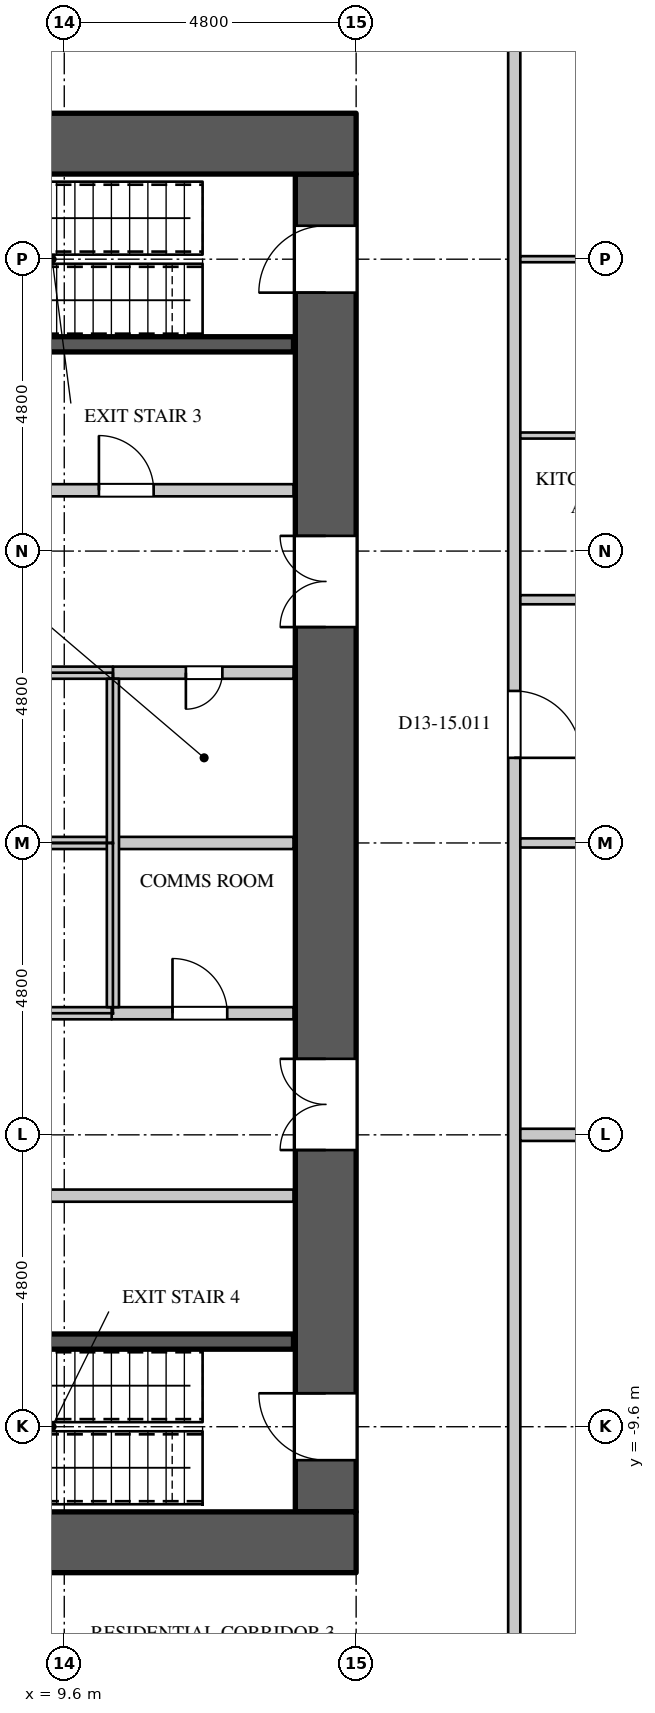
"""IFC4 building model, lengths in metres.
Left out: names, types, materials, properties, quantities, classifications, styles, units other than length and angle.
Written with IfcOpenShell. Run it as: python <this file> out.ifc"""

import sys

from ifc_helpers import new_model, si_unit, direction, frame, frame_2d, origin, place, context, subcontext, project, spatial, rectangle, extrude, element, fill, save


model = new_model("IFC4")
c1 = context("Model", 3, precision=1e-05, world=origin(), true_north=direction((0.0, 1.0)))
c2 = subcontext(c1, "Body", "Model", "MODEL_VIEW")
j1 = project(units=[si_unit("LENGTHUNIT", "METRE"), si_unit("PLANEANGLEUNIT", "RADIAN")], contexts=[c1])
p1 = place(None, origin())
s1 = spatial("IfcSite", under=j1, at=p1, CompositionType="ELEMENT")
p2 = place(p1, origin())
s2 = spatial("IfcBuilding", under=s1, at=p2, CompositionType="ELEMENT")
p3 = place(p2, frame((0.0, 0.0, 59.1)))
s3 = spatial("IfcBuildingStorey", under=s2, at=p3, CompositionType="ELEMENT", Elevation=59.1)
for number, where, z_axis, x_axis in (
    (1, (-14.4, 11.5, 0.0), (0.0, 0.0, 1.0), (1.0, 0.0, 0.0)),
    (2, (-14.4, -11.5, 0.0), (0.0, 0.0, 1.0), (1.0, 0.0, 0.0)),
):
    element("IfcWall", number, at=place(p3, frame(where, z_axis=z_axis, x_axis=x_axis)), inside=s3, PredefinedType="SHEAR", context=c2, shape_type="SweptSolid", body=[
        extrude(rectangle(XDim=28.8, YDim=1.0, at=frame_2d((14.4, 0.0))), origin(), (0.0, 0.0, 1.0), 4.2),
    ])
p4 = place(p3, frame((13.9, -11.0, 0.0), z_axis=(0.0, 0.0, 1.0), x_axis=(0.0, 1.0, 0.0)))
e3 = element("IfcWall", 3, at=p4, inside=s3, PredefinedType="SHEAR", context=c2, shape_type="SweptSolid", body=[
    extrude(rectangle(XDim=22.0, YDim=1.0, at=frame_2d((11.0, 0.0))), origin(), (0.0, 0.0, 1.0), 4.2),
])
p5 = place(p4, frame((20.05, 0.0, 0.0)))
e4 = element("IfcOpeningElement", 4, at=p5, cuts=e3, PredefinedType="OPENING", context=c2, shape_type="SweptSolid", body=[
    extrude(rectangle(XDim=1.1, YDim=2.2, at=frame_2d((0.55, 1.1))), frame((0.0, 0.51, 0.0), z_axis=(0.0, -1.0, 0.0), x_axis=(1.0, 0.0, 0.0)), (0.0, 0.0, 1.0), 1.02),
])
p6 = place(p4, frame((0.85, 0.0, 0.0)))
e5 = element("IfcOpeningElement", 5, at=p6, cuts=e3, PredefinedType="OPENING", context=c2, shape_type="SweptSolid", body=[
    extrude(rectangle(XDim=1.1, YDim=2.2, at=frame_2d((0.55, 1.1))), frame((0.0, 0.51, 0.0), z_axis=(0.0, -1.0, 0.0), x_axis=(1.0, 0.0, 0.0)), (0.0, 0.0, 1.0), 1.02),
])
p7 = place(p4, frame((14.55, 0.0, 0.0)))
e6 = element("IfcOpeningElement", 6, at=p7, cuts=e3, PredefinedType="OPENING", context=c2, shape_type="SweptSolid", body=[
    extrude(rectangle(XDim=1.5, YDim=2.4, at=frame_2d((0.75, 1.2))), frame((0.0, 0.51, 0.0), z_axis=(0.0, -1.0, 0.0), x_axis=(1.0, 0.0, 0.0)), (0.0, 0.0, 1.0), 1.02),
])
p8 = place(p4, frame((5.95, 0.0, 0.0)))
e7 = element("IfcOpeningElement", 7, at=p8, cuts=e3, PredefinedType="OPENING", context=c2, shape_type="SweptSolid", body=[
    extrude(rectangle(XDim=1.5, YDim=2.4, at=frame_2d((0.75, 1.2))), frame((0.0, 0.51, 0.0), z_axis=(0.0, -1.0, 0.0), x_axis=(1.0, 0.0, 0.0)), (0.0, 0.0, 1.0), 1.02),
])
p9 = place(p3, frame((-7.7, -5.8, 0.0), z_axis=(0.0, 0.0, 1.0), x_axis=(1.0, 0.0, 0.0)))
e8 = element("IfcWall", 8, at=p9, inside=s3, PredefinedType="PARTITIONING", context=c2, shape_type="SweptSolid", body=[
    extrude(rectangle(XDim=21.07, YDim=0.2, at=frame_2d((10.535, 0.0))), origin(), (0.0, 0.0, 1.0), 3.95),
])
p10 = place(p9, frame((5.25, 0.0, 0.0)))
e9 = element("IfcOpeningElement", 9, at=p10, cuts=e8, PredefinedType="OPENING", context=c2, shape_type="SweptSolid", body=[
    extrude(rectangle(XDim=0.9, YDim=2.2, at=frame_2d((0.45, 1.1))), frame((0.0, 0.11, 0.0), z_axis=(0.0, -1.0, 0.0), x_axis=(1.0, 0.0, 0.0)), (0.0, 0.0, 1.0), 0.22),
])
p11 = place(p9, frame((15.65, 0.0, 0.0)))
e10 = element("IfcOpeningElement", 10, at=p11, cuts=e8, PredefinedType="OPENING", context=c2, shape_type="SweptSolid", body=[
    extrude(rectangle(XDim=0.9, YDim=2.2, at=frame_2d((0.45, 1.1))), frame((0.0, 0.11, 0.0), z_axis=(0.0, -1.0, 0.0), x_axis=(1.0, 0.0, 0.0)), (0.0, 0.0, 1.0), 0.22),
])
p12 = place(p3, frame((7.82, 5.8, 0.0), z_axis=(0.0, 0.0, 1.0), x_axis=(1.0, 0.0, 0.0)))
e11 = element("IfcWall", 11, at=p12, inside=s3, PredefinedType="PARTITIONING", context=c2, shape_type="SweptSolid", body=[
    extrude(rectangle(XDim=5.55, YDim=0.2, at=frame_2d((2.775, 0.0))), origin(), (0.0, 0.0, 1.0), 3.95),
])
p13 = place(p12, frame((2.35, 0.0, 0.0)))
e12 = element("IfcOpeningElement", 12, at=p13, cuts=e11, PredefinedType="OPENING", context=c2, shape_type="SweptSolid", body=[
    extrude(rectangle(XDim=0.9, YDim=2.2, at=frame_2d((0.45, 1.1))), frame((0.0, 0.11, 0.0), z_axis=(0.0, -1.0, 0.0), x_axis=(1.0, 0.0, 0.0)), (0.0, 0.0, 1.0), 0.22),
])
p14 = place(p3, frame((17.0, -14.5, 0.0), z_axis=(0.0, 0.0, 1.0), x_axis=(0.0, 1.0, 0.0)))
e13 = element("IfcWall", 13, at=p14, inside=s3, PredefinedType="PARTITIONING", context=c2, shape_type="SweptSolid", body=[
    extrude(rectangle(XDim=29.0, YDim=0.2, at=frame_2d((14.5, 0.0))), origin(), (0.0, 0.0, 1.0), 3.95),
])
p15 = place(p14, frame((15.9, 0.0, 0.0)))
e14 = element("IfcOpeningElement", 14, at=p15, cuts=e13, PredefinedType="OPENING", context=c2, shape_type="SweptSolid", body=[
    extrude(rectangle(XDim=1.1, YDim=2.4, at=frame_2d((0.55, 1.2))), frame((0.0, 0.11, 0.0), z_axis=(0.0, -1.0, 0.0), x_axis=(1.0, 0.0, 0.0)), (0.0, 0.0, 1.0), 0.22),
])
p16 = place(p3, frame((16.02, -19.26, 0.0), z_axis=(0.0, 0.0, 1.0), x_axis=(0.707106781187, 0.707106781187, 0.0)))
e15 = element("IfcWall", 15, at=p16, inside=s3, PredefinedType="PARTITIONING", context=c2, shape_type="SweptSolid", body=[
    extrude(rectangle(XDim=10.229, YDim=0.15, at=frame_2d((5.114, 0.0))), origin(), (0.0, 0.0, 1.0), 3.95),
])
p17 = place(p16, frame((4.3, 0.0, 0.0)))
e16 = element("IfcOpeningElement", 16, at=p17, cuts=e15, PredefinedType="OPENING", context=c2, shape_type="SweptSolid", body=[
    extrude(rectangle(XDim=0.95, YDim=2.2, at=frame_2d((0.475, 1.1))), frame((0.0, 0.085, 0.0), z_axis=(0.0, -1.0, 0.0), x_axis=(1.0, 0.0, 0.0)), (0.0, 0.0, 1.0), 0.17),
])
p18 = place(p16, frame((0.6, 0.0, 0.0)))
e17 = element("IfcOpeningElement", 17, at=p18, cuts=e15, PredefinedType="OPENING", context=c2, shape_type="SweptSolid", body=[
    extrude(rectangle(XDim=0.95, YDim=2.2, at=frame_2d((0.475, 1.1))), frame((0.0, 0.085, 0.0), z_axis=(0.0, -1.0, 0.0), x_axis=(1.0, 0.0, 0.0)), (0.0, 0.0, 1.0), 0.17),
])
p19 = place(p16, frame((9.1, 0.0, 0.0)))
e18 = element("IfcOpeningElement", 18, at=p19, cuts=e15, PredefinedType="OPENING", context=c2, shape_type="SweptSolid", body=[
    extrude(rectangle(XDim=0.95, YDim=2.2, at=frame_2d((0.475, 1.1))), frame((0.0, 0.085, 0.0), z_axis=(0.0, -1.0, 0.0), x_axis=(1.0, 0.0, 0.0)), (0.0, 0.0, 1.0), 0.17),
])
p20 = place(p3, frame((17.1, 0.0, 0.0), z_axis=(0.0, 0.0, 1.0), x_axis=(1.0, 0.0, 0.0)))
e19 = element("IfcWall", 19, at=p20, inside=s3, PredefinedType="PARTITIONING", context=c2, shape_type="SweptSolid", body=[
    extrude(rectangle(XDim=11.755, YDim=0.15, at=frame_2d((5.877, 0.0))), origin(), (0.0, 0.0, 1.0), 3.95),
])
p21 = place(p20, frame((1.8, 0.0, 0.0)))
e20 = element("IfcOpeningElement", 20, at=p21, cuts=e19, PredefinedType="OPENING", context=c2, shape_type="SweptSolid", body=[
    extrude(rectangle(XDim=0.95, YDim=2.2, at=frame_2d((0.475, 1.1))), frame((0.0, 0.085, 0.0), z_axis=(0.0, -1.0, 0.0), x_axis=(1.0, 0.0, 0.0)), (0.0, 0.0, 1.0), 0.17),
])
p22 = place(p3, frame((17.1, 4.0, 0.0), z_axis=(0.0, 0.0, 1.0), x_axis=(1.0, 0.0, 0.0)))
e21 = element("IfcWall", 21, at=p22, inside=s3, PredefinedType="PARTITIONING", context=c2, shape_type="SweptSolid", body=[
    extrude(rectangle(XDim=4.625, YDim=0.15, at=frame_2d((2.312, 0.0))), origin(), (0.0, 0.0, 1.0), 3.95),
])
p23 = place(p22, frame((1.85, 0.0, 0.0)))
e22 = element("IfcOpeningElement", 22, at=p23, cuts=e21, PredefinedType="OPENING", context=c2, shape_type="SweptSolid", body=[
    extrude(rectangle(XDim=0.95, YDim=2.2, at=frame_2d((0.475, 1.1))), frame((0.0, 0.085, 0.0), z_axis=(0.0, -1.0, 0.0), x_axis=(1.0, 0.0, 0.0)), (0.0, 0.0, 1.0), 0.17),
])
p24 = place(p3, frame((17.499, 17.499, 0.0), z_axis=(0.0, 0.0, 1.0), x_axis=(0.707106781187, -0.707106781187, 0.0)))
e23 = element("IfcWall", 23, at=p24, inside=s3, PredefinedType="PARTITIONING", context=c2, shape_type="SweptSolid", body=[
    extrude(rectangle(XDim=7.855, YDim=0.15, at=frame_2d((3.927, 0.0))), origin(), (0.0, 0.0, 1.0), 3.95),
])
p25 = place(p24, frame((6.7, 0.0, 0.0)))
e24 = element("IfcOpeningElement", 24, at=p25, cuts=e23, PredefinedType="OPENING", context=c2, shape_type="SweptSolid", body=[
    extrude(rectangle(XDim=0.95, YDim=2.2, at=frame_2d((0.475, 1.1))), frame((0.0, 0.085, 0.0), z_axis=(0.0, -1.0, 0.0), x_axis=(1.0, 0.0, 0.0)), (0.0, 0.0, 1.0), 0.17),
])
p26 = place(p24, frame((2.1, 0.0, 0.0)))
e25 = element("IfcOpeningElement", 25, at=p26, cuts=e23, PredefinedType="OPENING", context=c2, shape_type="SweptSolid", body=[
    extrude(rectangle(XDim=0.95, YDim=2.2, at=frame_2d((0.475, 1.1))), frame((0.0, 0.085, 0.0), z_axis=(0.0, -1.0, 0.0), x_axis=(1.0, 0.0, 0.0)), (0.0, 0.0, 1.0), 0.17),
])
p27 = place(p3, frame((17.1, -4.8, 0.0), z_axis=(0.0, 0.0, 1.0), x_axis=(1.0, 0.0, 0.0)))
e26 = element("IfcWall", 26, at=p27, inside=s3, PredefinedType="PARTITIONING", context=c2, shape_type="SweptSolid", body=[
    extrude(rectangle(XDim=10.8, YDim=0.2, at=frame_2d((5.4, 0.0))), origin(), (0.0, 0.0, 1.0), 3.25),
])
p28 = place(p3, frame((10.38, -2.8, 0.0), z_axis=(0.0, 0.0, 1.0), x_axis=(1.0, 0.0, 0.0)))
e27 = element("IfcWall", 27, at=p28, inside=s3, PredefinedType="PARTITIONING", context=c2, shape_type="SweptSolid", body=[
    extrude(rectangle(XDim=2.99, YDim=0.2, at=frame_2d((1.495, 0.0))), origin(), (0.0, 0.0, 1.0), 3.95),
])
p29 = place(p28, frame((1.0, 0.0, 0.0)))
e28 = element("IfcOpeningElement", 28, at=p29, cuts=e27, PredefinedType="OPENING", context=c2, shape_type="SweptSolid", body=[
    extrude(rectangle(XDim=0.9, YDim=2.2, at=frame_2d((0.45, 1.1))), frame((0.0, 0.11, 0.0), z_axis=(0.0, -1.0, 0.0), x_axis=(1.0, 0.0, 0.0)), (0.0, 0.0, 1.0), 0.22),
])
p30 = place(p3, frame((10.4, 2.8, 0.0), z_axis=(0.0, 0.0, 1.0), x_axis=(1.0, 0.0, 0.0)))
e29 = element("IfcWall", 29, at=p30, inside=s3, PredefinedType="PARTITIONING", context=c2, shape_type="SweptSolid", body=[
    extrude(rectangle(XDim=2.97, YDim=0.2, at=frame_2d((1.485, 0.0))), origin(), (0.0, 0.0, 1.0), 3.95),
])
p31 = place(p30, frame((1.2, 0.0, 0.0)))
e30 = element("IfcOpeningElement", 30, at=p31, cuts=e29, PredefinedType="OPENING", context=c2, shape_type="SweptSolid", body=[
    extrude(rectangle(XDim=0.6, YDim=2.0, at=frame_2d((0.3, 1.0))), frame((0.0, 0.11, 0.0), z_axis=(0.0, -1.0, 0.0), x_axis=(1.0, 0.0, 0.0)), (0.0, 0.0, 1.0), 0.22),
])
p32 = place(p3, frame((10.4, 0.0, 0.0), z_axis=(0.0, 0.0, 1.0), x_axis=(1.0, 0.0, 0.0)))
e31 = element("IfcWall", 31, at=p32, inside=s3, PredefinedType="PARTITIONING", context=c2, shape_type="SweptSolid", body=[
    extrude(rectangle(XDim=2.97, YDim=0.2, at=frame_2d((1.485, 0.0))), origin(), (0.0, 0.0, 1.0), 3.95),
])
p33 = place(p3, frame((-13.37, 0.0, 0.0), z_axis=(0.0, 0.0, 1.0), x_axis=(1.0, 0.0, 0.0)))
e32 = element("IfcWall", 32, at=p33, inside=s3, PredefinedType="PARTITIONING", context=c2, shape_type="SweptSolid", body=[
    extrude(rectangle(XDim=23.77, YDim=0.2, at=frame_2d((11.885, 0.0))), origin(), (0.0, 0.0, 1.0), 3.95),
])
p34 = place(p3, frame((-13.37, 2.8, 0.0), z_axis=(0.0, 0.0, 1.0), x_axis=(1.0, 0.0, 0.0)))
e33 = element("IfcWall", 33, at=p34, inside=s3, PredefinedType="PARTITIONING", context=c2, shape_type="SweptSolid", body=[
    extrude(rectangle(XDim=23.77, YDim=0.2, at=frame_2d((11.885, 0.0))), origin(), (0.0, 0.0, 1.0), 3.95),
])
p35 = place(p34, frame((0.9, 0.0, 0.0)))
e34 = element("IfcOpeningElement", 34, at=p35, cuts=e33, PredefinedType="OPENING", context=c2, shape_type="SweptSolid", body=[
    extrude(rectangle(XDim=1.1, YDim=2.2, at=frame_2d((0.55, 1.1))), frame((0.0, 0.11, 0.0), z_axis=(0.0, -1.0, 0.0), x_axis=(1.0, 0.0, 0.0)), (0.0, 0.0, 1.0), 0.22),
])
p36 = place(p34, frame((3.7, 0.0, 0.0)))
e35 = element("IfcOpeningElement", 35, at=p36, cuts=e33, PredefinedType="OPENING", context=c2, shape_type="SweptSolid", body=[
    extrude(rectangle(XDim=1.1, YDim=2.2, at=frame_2d((0.55, 1.1))), frame((0.0, 0.11, 0.0), z_axis=(0.0, -1.0, 0.0), x_axis=(1.0, 0.0, 0.0)), (0.0, 0.0, 1.0), 0.22),
])
p37 = place(p34, frame((6.3, 0.0, 0.0)))
e36 = element("IfcOpeningElement", 36, at=p37, cuts=e33, PredefinedType="OPENING", context=c2, shape_type="SweptSolid", body=[
    extrude(rectangle(XDim=1.1, YDim=2.2, at=frame_2d((0.55, 1.1))), frame((0.0, 0.11, 0.0), z_axis=(0.0, -1.0, 0.0), x_axis=(1.0, 0.0, 0.0)), (0.0, 0.0, 1.0), 0.22),
])
p38 = place(p34, frame((8.9, 0.0, 0.0)))
e37 = element("IfcOpeningElement", 37, at=p38, cuts=e33, PredefinedType="OPENING", context=c2, shape_type="SweptSolid", body=[
    extrude(rectangle(XDim=1.1, YDim=2.2, at=frame_2d((0.55, 1.1))), frame((0.0, 0.11, 0.0), z_axis=(0.0, -1.0, 0.0), x_axis=(1.0, 0.0, 0.0)), (0.0, 0.0, 1.0), 0.22),
])
p39 = place(p34, frame((11.5, 0.0, 0.0)))
e38 = element("IfcOpeningElement", 38, at=p39, cuts=e33, PredefinedType="OPENING", context=c2, shape_type="SweptSolid", body=[
    extrude(rectangle(XDim=1.1, YDim=2.2, at=frame_2d((0.55, 1.1))), frame((0.0, 0.11, 0.0), z_axis=(0.0, -1.0, 0.0), x_axis=(1.0, 0.0, 0.0)), (0.0, 0.0, 1.0), 0.22),
])
p40 = place(p34, frame((14.1, 0.0, 0.0)))
e39 = element("IfcOpeningElement", 39, at=p40, cuts=e33, PredefinedType="OPENING", context=c2, shape_type="SweptSolid", body=[
    extrude(rectangle(XDim=1.1, YDim=2.2, at=frame_2d((0.55, 1.1))), frame((0.0, 0.11, 0.0), z_axis=(0.0, -1.0, 0.0), x_axis=(1.0, 0.0, 0.0)), (0.0, 0.0, 1.0), 0.22),
])
p41 = place(p34, frame((16.7, 0.0, 0.0)))
e40 = element("IfcOpeningElement", 40, at=p41, cuts=e33, PredefinedType="OPENING", context=c2, shape_type="SweptSolid", body=[
    extrude(rectangle(XDim=1.1, YDim=2.2, at=frame_2d((0.55, 1.1))), frame((0.0, 0.11, 0.0), z_axis=(0.0, -1.0, 0.0), x_axis=(1.0, 0.0, 0.0)), (0.0, 0.0, 1.0), 0.22),
])
p42 = place(p34, frame((19.3, 0.0, 0.0)))
e41 = element("IfcOpeningElement", 41, at=p42, cuts=e33, PredefinedType="OPENING", context=c2, shape_type="SweptSolid", body=[
    extrude(rectangle(XDim=1.1, YDim=2.2, at=frame_2d((0.55, 1.1))), frame((0.0, 0.11, 0.0), z_axis=(0.0, -1.0, 0.0), x_axis=(1.0, 0.0, 0.0)), (0.0, 0.0, 1.0), 0.22),
])
p43 = place(p3, frame((7.82, -2.8, 0.0), z_axis=(0.0, 0.0, 1.0), x_axis=(1.0, 0.0, 0.0)))
e42 = element("IfcWall", 42, at=p43, inside=s3, PredefinedType="PARTITIONING", context=c2, shape_type="SweptSolid", body=[
    extrude(rectangle(XDim=2.56, YDim=0.2, at=frame_2d((1.28, 0.0))), origin(), (0.0, 0.0, 1.0), 3.95),
])
p44 = place(p3, frame((10.4, -2.7, 0.0), z_axis=(0.0, 0.0, 1.0), x_axis=(0.0, 1.0, 0.0)))
e43 = element("IfcWall", 43, at=p44, inside=s3, PredefinedType="PARTITIONING", context=c2, shape_type="SweptSolid", body=[
    extrude(rectangle(XDim=5.4, YDim=0.2, at=frame_2d((2.7, 0.0))), origin(), (0.0, 0.0, 1.0), 3.95),
])
for number, where, z_axis, x_axis in (
    (44, (5.275, -8.2, 0.0), (0.0, 0.0, 1.0), (1.0, 0.0, 0.0)),
    (45, (5.275, 8.2, 0.0), (0.0, 0.0, 1.0), (1.0, 0.0, 0.0)),
):
    element("IfcWall", number, at=place(p3, frame(where, z_axis=z_axis, x_axis=x_axis)), inside=s3, PredefinedType="SHEAR", context=c2, shape_type="SweptSolid", body=[
        extrude(rectangle(XDim=8.095, YDim=0.25, at=frame_2d((4.048, 0.0))), origin(), (0.0, 0.0, 1.0), 3.95),
    ])
p45 = place(p3, frame((17.1, 6.7, 0.0), z_axis=(0.0, 0.0, 1.0), x_axis=(1.0, 0.0, 0.0)))
e46 = element("IfcWall", 46, at=p45, inside=s3, PredefinedType="PARTITIONING", context=c2, shape_type="SweptSolid", body=[
    extrude(rectangle(XDim=4.625, YDim=0.1, at=frame_2d((2.312, 0.0))), origin(), (0.0, 0.0, 1.0), 3.95),
])
p46 = place(p3, frame((17.1, 9.6, 0.0), z_axis=(0.0, 0.0, 1.0), x_axis=(1.0, 0.0, 0.0)))
e47 = element("IfcWall", 47, at=p46, inside=s3, PredefinedType="PARTITIONING", context=c2, shape_type="SweptSolid", body=[
    extrude(rectangle(XDim=4.7, YDim=0.1, at=frame_2d((2.35, 0.0))), origin(), (0.0, 0.0, 1.0), 3.95),
])
p47 = place(p46, frame((1.85, 0.0, 0.0)))
e48 = element("IfcOpeningElement", 48, at=p47, cuts=e47, PredefinedType="OPENING", context=c2, shape_type="SweptSolid", body=[
    extrude(rectangle(XDim=0.9, YDim=2.2, at=frame_2d((0.45, 1.1))), frame((0.0, 0.06, 0.0), z_axis=(0.0, -1.0, 0.0), x_axis=(1.0, 0.0, 0.0)), (0.0, 0.0, 1.0), 0.12),
])
p48 = place(p31, origin())
e49 = element("IfcDoor", 49, at=p48, inside=s3, OperationType="SINGLE_SWING_RIGHT", PredefinedType="DOOR", context=c2, shape_type="SweptSolid", body=[
    extrude(rectangle(XDim=0.6, YDim=2.0, at=frame_2d((0.3, 1.0))), frame((0.0, 0.025, 0.0), z_axis=(0.0, -1.0, 0.0), x_axis=(1.0, 0.0, 0.0)), (0.0, 0.0, 1.0), 0.05),
])
fill(e30, e49)
p49 = place(p29, origin())
e50 = element("IfcDoor", 50, at=p49, inside=s3, OperationType="SINGLE_SWING_LEFT", PredefinedType="DOOR", context=c2, shape_type="SweptSolid", body=[
    extrude(rectangle(XDim=0.9, YDim=2.2, at=frame_2d((0.45, 1.1))), frame((0.0, 0.025, 0.0), z_axis=(0.0, -1.0, 0.0), x_axis=(1.0, 0.0, 0.0)), (0.0, 0.0, 1.0), 0.05),
])
fill(e28, e50)
p50 = place(p13, origin())
e51 = element("IfcDoor", 51, at=p50, inside=s3, OperationType="SINGLE_SWING_LEFT", PredefinedType="DOOR", context=c2, shape_type="SweptSolid", body=[
    extrude(rectangle(XDim=0.9, YDim=2.2, at=frame_2d((0.45, 1.1))), frame((0.0, 0.025, 0.0), z_axis=(0.0, -1.0, 0.0), x_axis=(1.0, 0.0, 0.0)), (0.0, 0.0, 1.0), 0.05),
])
fill(e12, e51)
p51 = place(p5, origin())
e52 = element("IfcDoor", 52, at=p51, inside=s3, OperationType="SINGLE_SWING_LEFT", PredefinedType="DOOR", context=c2, shape_type="SweptSolid", body=[
    extrude(rectangle(XDim=1.1, YDim=2.2, at=frame_2d((0.55, 1.1))), frame((0.0, 0.495, 0.0), z_axis=(0.0, -1.0, 0.0), x_axis=(1.0, 0.0, 0.0)), (0.0, 0.0, 1.0), 0.05),
])
fill(e4, e52)
p52 = place(p6, origin())
e53 = element("IfcDoor", 53, at=p52, inside=s3, OperationType="SINGLE_SWING_RIGHT", PredefinedType="DOOR", context=c2, shape_type="SweptSolid", body=[
    extrude(rectangle(XDim=1.1, YDim=2.2, at=frame_2d((0.55, 1.1))), frame((0.0, 0.495, 0.0), z_axis=(0.0, -1.0, 0.0), x_axis=(1.0, 0.0, 0.0)), (0.0, 0.0, 1.0), 0.05),
])
fill(e5, e53)
p53 = place(p7, origin())
e54 = element("IfcDoor", 54, at=p53, inside=s3, OperationType="DOUBLE_DOOR_SINGLE_SWING", PredefinedType="DOOR", context=c2, shape_type="SweptSolid", body=[
    extrude(rectangle(XDim=1.5, YDim=2.4, at=frame_2d((0.75, 1.2))), frame((0.0, 0.495, 0.0), z_axis=(0.0, -1.0, 0.0), x_axis=(1.0, 0.0, 0.0)), (0.0, 0.0, 1.0), 0.05),
])
fill(e6, e54)
p54 = place(p8, origin())
e55 = element("IfcDoor", 55, at=p54, inside=s3, OperationType="DOUBLE_DOOR_SINGLE_SWING", PredefinedType="DOOR", context=c2, shape_type="SweptSolid", body=[
    extrude(rectangle(XDim=1.5, YDim=2.4, at=frame_2d((0.75, 1.2))), frame((0.0, 0.495, 0.0), z_axis=(0.0, -1.0, 0.0), x_axis=(1.0, 0.0, 0.0)), (0.0, 0.0, 1.0), 0.05),
])
fill(e7, e55)
p55 = place(p15, origin())
e56 = element("IfcDoor", 56, at=p55, inside=s3, OperationType="SINGLE_SWING_RIGHT", PredefinedType="DOOR", context=c2, shape_type="SweptSolid", body=[
    extrude(rectangle(XDim=1.1, YDim=2.4, at=frame_2d((0.55, 1.2))), frame((0.0, 0.025, 0.0), z_axis=(0.0, -1.0, 0.0), x_axis=(1.0, 0.0, 0.0)), (0.0, 0.0, 1.0), 0.05),
])
fill(e14, e56)
save(model, sys.argv[1])
